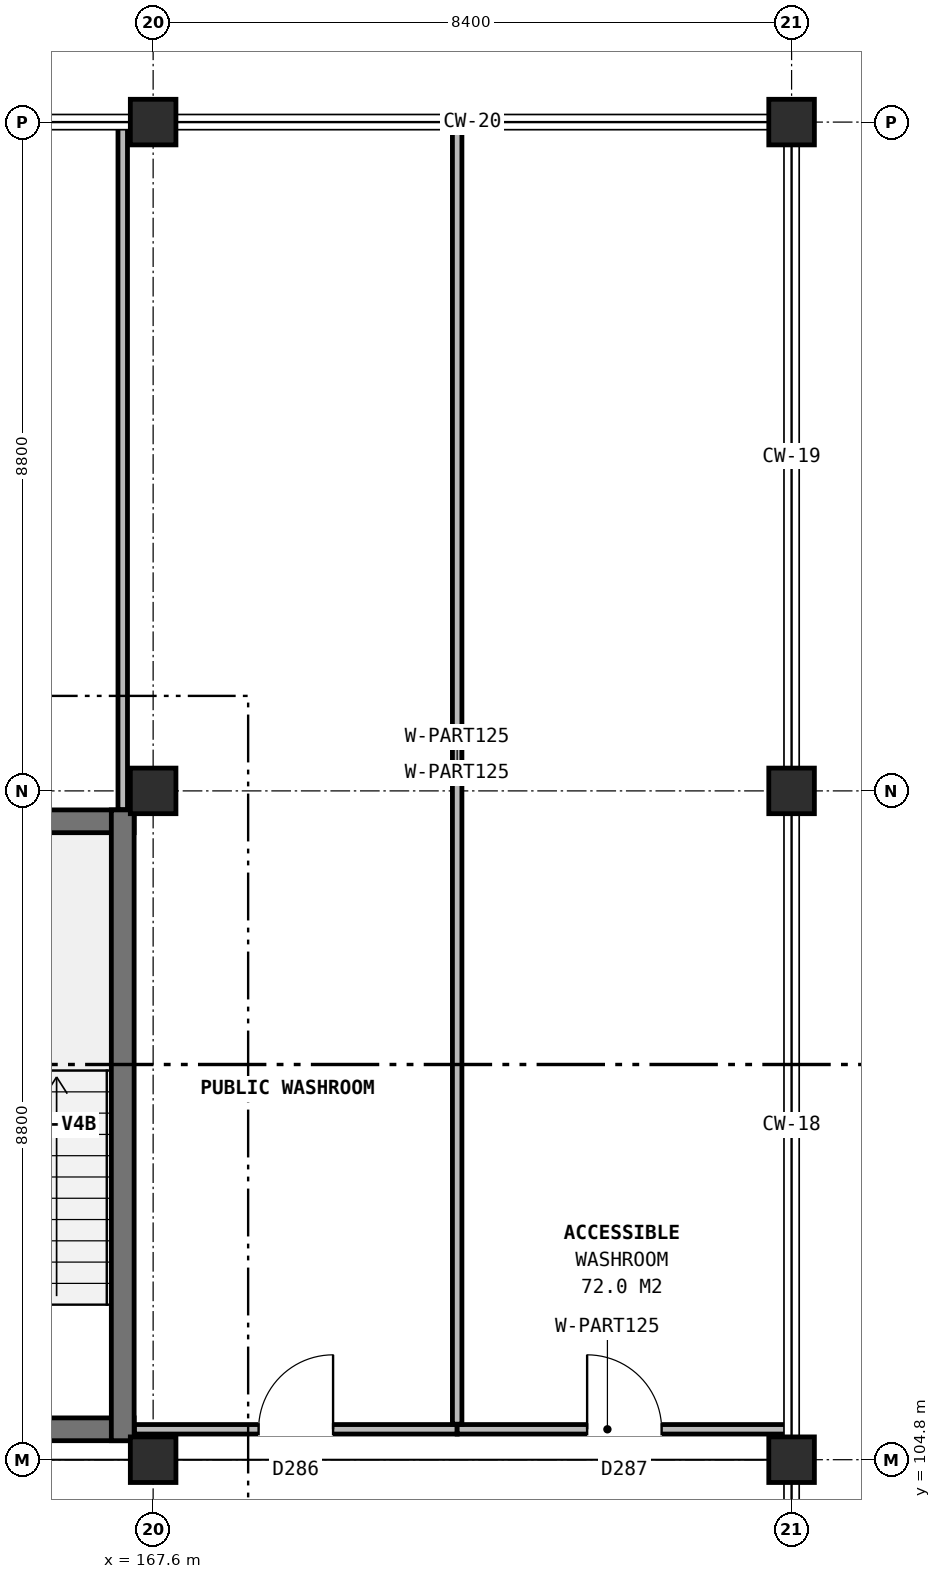
"""IFC4 building model, lengths in metres.
Left out: names, types, materials, properties, quantities, classifications, styles, units other than length and angle.
Written with IfcOpenShell. Run it as: python <this file> out.ifc"""

import sys

from ifc_helpers import new_model, si_unit, direction, frame, frame_2d, origin, origin_2d, place, context, subcontext, project, spatial, rectangle, extrude, element, fill, save


model = new_model("IFC4")
c1 = context("Model", 3, precision=1e-05, world=origin(), true_north=direction((0.0, 1.0)))
c2 = subcontext(c1, "Body", "Model", "MODEL_VIEW")
j1 = project(units=[si_unit("LENGTHUNIT", "METRE"), si_unit("PLANEANGLEUNIT", "RADIAN")], contexts=[c1])
p1 = place(None, origin())
s1 = spatial("IfcSite", under=j1, at=p1, CompositionType="ELEMENT")
p2 = place(p1, origin())
s2 = spatial("IfcBuilding", under=s1, at=p2, CompositionType="ELEMENT")
p3 = place(p2, frame((0.0, 0.0, 63.8)))
s3 = spatial("IfcBuildingStorey", under=s2, at=p3, CompositionType="ELEMENT", Elevation=63.8)
for number, where, z_axis, x_axis in (
    (1, (167.6, 104.8, 0.0), (0.0, 0.0, 1.0), (1.0, 0.0, 0.0)),
    (2, (167.6, 113.6, 0.0), (0.0, 0.0, 1.0), (1.0, 0.0, 0.0)),
    (3, (167.6, 122.4, 0.0), (0.0, 0.0, 1.0), (1.0, 0.0, 0.0)),
    (4, (176.0, 104.8, 0.0), (0.0, 0.0, 1.0), (1.0, 0.0, 0.0)),
    (5, (176.0, 113.6, 0.0), (0.0, 0.0, 1.0), (1.0, 0.0, 0.0)),
    (6, (176.0, 122.4, 0.0), (0.0, 0.0, 1.0), (1.0, 0.0, 0.0)),
):
    element("IfcColumn", number, at=place(p3, frame(where, z_axis=z_axis, x_axis=x_axis)), inside=s3, PredefinedType="COLUMN", context=c2, shape_type="SweptSolid", body=[
        extrude(rectangle(XDim=0.6, YDim=0.6, at=origin_2d()), origin(), (0.0, 0.0, 1.0), 4.2),
    ])
p4 = place(p3, frame((163.75, 105.2, 0.0), z_axis=(0.0, 0.0, 1.0), x_axis=(1.0, 0.0, 0.0)))
e7 = element("IfcWall", 7, at=p4, inside=s3, PredefinedType="SHEAR", context=c2, shape_type="SweptSolid", body=[
    extrude(rectangle(XDim=3.6, YDim=0.3, at=frame_2d((1.8, 0.0))), origin(), (0.0, 0.0, 1.0), 4.2),
])
p5 = place(p4, frame((1.05, 0.0, 0.0)))
e8 = element("IfcOpeningElement", 8, at=p5, cuts=e7, PredefinedType="OPENING", context=c2, shape_type="SweptSolid", body=[
    extrude(rectangle(XDim=1.1, YDim=2.2, at=frame_2d((0.55, 1.1))), frame((0.0, 0.16, 0.0), z_axis=(0.0, -1.0, 0.0), x_axis=(1.0, 0.0, 0.0)), (0.0, 0.0, 1.0), 0.32),
])
p6 = place(p3, frame((163.75, 113.2, 0.0), z_axis=(0.0, 0.0, 1.0), x_axis=(1.0, 0.0, 0.0)))
e9 = element("IfcWall", 9, at=p6, inside=s3, PredefinedType="SHEAR", context=c2, shape_type="SweptSolid", body=[
    extrude(rectangle(XDim=3.6, YDim=0.3, at=frame_2d((1.8, 0.0))), origin(), (0.0, 0.0, 1.0), 4.2),
])
p7 = place(p3, frame((167.2, 105.05, 0.0), z_axis=(0.0, 0.0, 1.0), x_axis=(0.0, 1.0, 0.0)))
e10 = element("IfcWall", 10, at=p7, inside=s3, PredefinedType="SHEAR", context=c2, shape_type="SweptSolid", body=[
    extrude(rectangle(XDim=8.3, YDim=0.3, at=frame_2d((4.15, 0.0))), origin(), (0.0, 0.0, 1.0), 4.2),
])
p8 = place(p3, frame((167.355, 105.2, 0.0), z_axis=(0.0, 0.0, 1.0), x_axis=(1.0, 0.0, 0.0)))
e11 = element("IfcWall", 11, at=p8, inside=s3, PredefinedType="PARTITIONING", context=c2, shape_type="SweptSolid", body=[
    extrude(rectangle(XDim=4.245, YDim=0.125, at=frame_2d((2.123, 0.0))), origin(), (0.0, 0.0, 1.0), 3.445),
])
p9 = place(p8, frame((1.633, 0.0, 0.0)))
e12 = element("IfcOpeningElement", 12, at=p9, cuts=e11, PredefinedType="OPENING", context=c2, shape_type="SweptSolid", body=[
    extrude(rectangle(XDim=0.98, YDim=2.1, at=frame_2d((0.49, 1.05))), frame((0.0, 0.073, 0.0), z_axis=(0.0, -1.0, 0.0), x_axis=(1.0, 0.0, 0.0)), (0.0, 0.0, 1.0), 0.145),
])
p10 = place(p3, frame((171.6, 105.2, 0.0), z_axis=(0.0, 0.0, 1.0), x_axis=(1.0, 0.0, 0.0)))
e13 = element("IfcWall", 13, at=p10, inside=s3, PredefinedType="PARTITIONING", context=c2, shape_type="SweptSolid", body=[
    extrude(rectangle(XDim=4.4, YDim=0.125, at=frame_2d((2.2, 0.0))), origin(), (0.0, 0.0, 1.0), 3.445),
])
p11 = place(p10, frame((1.71, 0.0, 0.0)))
e14 = element("IfcOpeningElement", 14, at=p11, cuts=e13, PredefinedType="OPENING", context=c2, shape_type="SweptSolid", body=[
    extrude(rectangle(XDim=0.98, YDim=2.1, at=frame_2d((0.49, 1.05))), frame((0.0, 0.073, 0.0), z_axis=(0.0, -1.0, 0.0), x_axis=(1.0, 0.0, 0.0)), (0.0, 0.0, 1.0), 0.145),
])
p12 = place(p3, frame((167.2, 113.355, 0.0), z_axis=(0.0, 0.0, 1.0), x_axis=(0.0, 1.0, 0.0)))
e15 = element("IfcWall", 15, at=p12, inside=s3, PredefinedType="PARTITIONING", context=c2, shape_type="SweptSolid", body=[
    extrude(rectangle(XDim=9.045, YDim=0.125, at=frame_2d((4.522, 0.0))), origin(), (0.0, 0.0, 1.0), 3.445),
])
p13 = place(p3, frame((171.6, 105.268, 0.0), z_axis=(0.0, 0.0, 1.0), x_axis=(0.0, 1.0, 0.0)))
e16 = element("IfcWall", 16, at=p13, inside=s3, PredefinedType="PARTITIONING", context=c2, shape_type="SweptSolid", body=[
    extrude(rectangle(XDim=17.132, YDim=0.125, at=frame_2d((8.566, 0.0))), origin(), (0.0, 0.0, 1.0), 3.865),
])
p14 = place(p9, origin())
e17 = element("IfcDoor", 17, at=p14, inside=s3, OperationType="SINGLE_SWING_RIGHT", PredefinedType="DOOR", context=c2, shape_type="SweptSolid", body=[
    extrude(rectangle(XDim=0.98, YDim=2.1, at=frame_2d((0.49, 1.05))), frame((0.0, 0.025, 0.0), z_axis=(0.0, -1.0, 0.0), x_axis=(1.0, 0.0, 0.0)), (0.0, 0.0, 1.0), 0.05),
])
fill(e12, e17)
p15 = place(p11, origin())
e18 = element("IfcDoor", 18, at=p15, inside=s3, OperationType="SINGLE_SWING_LEFT", PredefinedType="DOOR", context=c2, shape_type="SweptSolid", body=[
    extrude(rectangle(XDim=0.98, YDim=2.1, at=frame_2d((0.49, 1.05))), frame((0.0, 0.025, 0.0), z_axis=(0.0, -1.0, 0.0), x_axis=(1.0, 0.0, 0.0)), (0.0, 0.0, 1.0), 0.05),
])
fill(e14, e18)
save(model, sys.argv[1])
